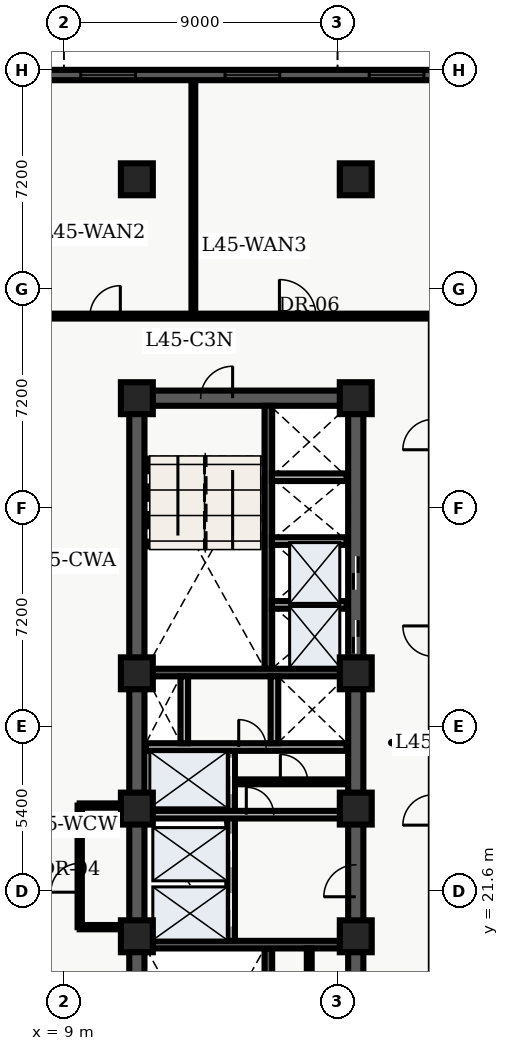
"""IFC4 building model, lengths in metres.
Left out: names, types, materials, properties, quantities, classifications, styles, units other than length and angle.
Written with IfcOpenShell. Run it as: python <this file> out.ifc"""

import sys

from ifc_helpers import new_model, entity, si_unit, converted_unit, direction, frame, origin_with_axes, origin_2d_with_axis, place, context, subcontext, project, spatial, polyline, rectangle, outline, extrude, element, fill, save


model = new_model("IFC4")
c1 = context("Model", 3, precision=1e-05, world=origin_with_axes(), true_north=direction((0.0, 1.0)))
c2 = subcontext(c1, "Body", "Model", "MODEL_VIEW")
j1 = project(units=[si_unit("LENGTHUNIT", "METRE"), converted_unit("PLANEANGLEUNIT", "DEGREE", entity("IfcPlaneAngleMeasure", 0.017), si_unit("PLANEANGLEUNIT", "RADIAN"), dimensions=[0, 0, 0, 0, 0, 0, 0])], contexts=[c1])
p1 = place(None, origin_with_axes())
s1 = spatial("IfcSite", under=j1, at=p1, CompositionType="ELEMENT")
p2 = place(p1, origin_with_axes())
s2 = spatial("IfcBuilding", under=s1, at=p2, CompositionType="ELEMENT")
p3 = place(p2, frame((0.0, 0.0, 183.6), z_axis=(0.0, 0.0, 1.0), x_axis=(1.0, 0.0, 0.0)))
s3 = spatial("IfcBuildingStorey", under=s2, at=p3, CompositionType="ELEMENT", Elevation=183.6)
p4 = place(p3, frame((11.4, 10.8, 0.0), z_axis=(0.0, 0.0, 1.0), x_axis=(0.0, 1.0, 0.0)))
e1 = element("IfcWall", 1, at=p4, inside=s3, PredefinedType="SHEAR", context=c2, shape_type="SweptSolid", body=[
    extrude(outline(polyline([(0.0, -0.25), (27.0, -0.25), (27.0, 0.25), (0.0, 0.25), (0.0, -0.25)])), origin_with_axes(), (0.0, 0.0, 1.0), 3.6),
])
p5 = place(p3, frame((11.4, 37.8, 0.0), z_axis=(0.0, 0.0, 1.0), x_axis=(1.0, 0.0, 0.0)))
e2 = element("IfcWall", 2, at=p5, inside=s3, PredefinedType="SHEAR", context=c2, shape_type="SweptSolid", body=[
    extrude(outline(polyline([(0.0, -0.25), (7.2, -0.25), (7.2, 0.25), (0.0, 0.25), (0.0, -0.25)])), origin_with_axes(), (0.0, 0.0, 1.0), 3.6),
])
p6 = place(p5, frame((2.625, 0.0, 0.0), z_axis=(0.0, 0.0, 1.0), x_axis=(1.0, 0.0, 0.0)))
e3 = element("IfcOpeningElement", 3, at=p6, cuts=e2, PredefinedType="OPENING", context=c2, shape_type="SweptSolid", body=[
    extrude(rectangle(XDim=1.05, YDim=0.52, at=origin_2d_with_axis()), origin_with_axes(), (0.0, 0.0, 1.0), 2.15),
])
p7 = place(p3, frame((18.6, 10.8, 0.0), z_axis=(0.0, 0.0, 1.0), x_axis=(0.0, 1.0, 0.0)))
e4 = element("IfcWall", 4, at=p7, inside=s3, PredefinedType="SHEAR", context=c2, shape_type="SweptSolid", body=[
    extrude(outline(polyline([(0.0, -0.25), (13.5, -0.25), (13.5, 0.25), (0.0, 0.25), (0.0, -0.25)])), origin_with_axes(), (0.0, 0.0, 1.0), 3.6),
])
p8 = place(p7, frame((11.125, 0.0, 0.0), z_axis=(0.0, 0.0, 1.0), x_axis=(1.0, 0.0, 0.0)))
e5 = element("IfcOpeningElement", 5, at=p8, cuts=e4, PredefinedType="OPENING", context=c2, shape_type="SweptSolid", body=[
    extrude(rectangle(XDim=1.05, YDim=0.52, at=origin_2d_with_axis()), origin_with_axes(), (0.0, 0.0, 1.0), 2.15),
])
p9 = place(p7, frame((2.125, 0.0, 0.0), z_axis=(0.0, 0.0, 1.0), x_axis=(1.0, 0.0, 0.0)))
e6 = element("IfcOpeningElement", 6, at=p9, cuts=e4, PredefinedType="OPENING", context=c2, shape_type="SweptSolid", body=[
    extrude(rectangle(XDim=0.95, YDim=0.52, at=origin_2d_with_axis()), origin_with_axes(), (0.0, 0.0, 1.0), 2.15),
])
p10 = place(p7, frame((6.275, 0.0, 0.0), z_axis=(0.0, 0.0, 1.0), x_axis=(1.0, 0.0, 0.0)))
e7 = element("IfcOpeningElement", 7, at=p10, cuts=e4, PredefinedType="OPENING", context=c2, shape_type="SweptSolid", body=[
    extrude(rectangle(XDim=0.95, YDim=0.52, at=origin_2d_with_axis()), origin_with_axes(), (0.0, 0.0, 1.0), 2.15),
])
p11 = place(p3, frame((18.6, 24.3, 0.0), z_axis=(0.0, 0.0, 1.0), x_axis=(0.0, 1.0, 0.0)))
e8 = element("IfcWall", 8, at=p11, inside=s3, PredefinedType="SHEAR", context=c2, shape_type="SweptSolid", body=[
    extrude(outline(polyline([(0.0, -0.25), (13.5, -0.25), (13.5, 0.25), (0.0, 0.25), (0.0, -0.25)])), origin_with_axes(), (0.0, 0.0, 1.0), 3.6),
])
p12 = place(p11, frame((5.65, 0.0, 0.0), z_axis=(0.0, 0.0, 1.0), x_axis=(1.0, 0.0, 0.0)))
e9 = element("IfcOpeningElement", 9, at=p12, cuts=e8, PredefinedType="OPENING", context=c2, shape_type="SweptSolid", body=[
    extrude(rectangle(XDim=1.1, YDim=0.52, at=origin_2d_with_axis()), origin_with_axes(), (0.0, 0.0, 1.0), 2.15),
])
p13 = place(p11, frame((7.75, 0.0, 0.0), z_axis=(0.0, 0.0, 1.0), x_axis=(1.0, 0.0, 0.0)))
e10 = element("IfcOpeningElement", 10, at=p13, cuts=e8, PredefinedType="OPENING", context=c2, shape_type="SweptSolid", body=[
    extrude(rectangle(XDim=1.1, YDim=0.52, at=origin_2d_with_axis()), origin_with_axes(), (0.0, 0.0, 1.0), 2.15),
])
p14 = place(p3, frame((15.725, 11.05, 0.0), z_axis=(0.0, 0.0, 1.0), x_axis=(0.0, 1.0, 0.0)))
e11 = element("IfcWall", 11, at=p14, inside=s3, PredefinedType="SHEAR", context=c2, shape_type="SweptSolid", body=[
    extrude(outline(polyline([(0.0, -0.125), (8.65, -0.125), (8.65, 0.125), (0.0, 0.125), (0.0, -0.125)])), origin_with_axes(), (0.0, 0.0, 1.0), 3.6),
])
p15 = place(p3, frame((11.65, 19.825, 0.0), z_axis=(0.0, 0.0, 1.0), x_axis=(1.0, 0.0, 0.0)))
e12 = element("IfcWall", 12, at=p15, inside=s3, PredefinedType="SHEAR", context=c2, shape_type="SweptSolid", body=[
    extrude(outline(polyline([(0.0, -0.125), (6.7, -0.125), (6.7, 0.125), (0.0, 0.125), (0.0, -0.125)])), origin_with_axes(), (0.0, 0.0, 1.0), 3.6),
])
p16 = place(p3, frame((15.725, 28.9, 0.0), z_axis=(0.0, 0.0, 1.0), x_axis=(0.0, 1.0, 0.0)))
e13 = element("IfcWall", 13, at=p16, inside=s3, PredefinedType="SHEAR", context=c2, shape_type="SweptSolid", body=[
    extrude(outline(polyline([(0.0, -0.125), (8.65, -0.125), (8.65, 0.125), (0.0, 0.125), (0.0, -0.125)])), origin_with_axes(), (0.0, 0.0, 1.0), 3.6),
])
p17 = place(p3, frame((11.65, 28.775, 0.0), z_axis=(0.0, 0.0, 1.0), x_axis=(1.0, 0.0, 0.0)))
e14 = element("IfcWall", 14, at=p17, inside=s3, PredefinedType="SHEAR", context=c2, shape_type="SweptSolid", body=[
    extrude(outline(polyline([(0.0, -0.125), (6.7, -0.125), (6.7, 0.125), (0.0, 0.125), (0.0, -0.125)])), origin_with_axes(), (0.0, 0.0, 1.0), 3.6),
])
p18 = place(p3, frame((14.5, 19.95, 0.0), z_axis=(0.0, 0.0, 1.0), x_axis=(0.0, 1.0, 0.0)))
e15 = element("IfcWall", 15, at=p18, inside=s3, PredefinedType="SOLIDWALL", context=c2, shape_type="SweptSolid", body=[
    extrude(outline(polyline([(0.0, -0.125), (6.25, -0.125), (6.25, 0.125), (0.0, 0.125), (0.0, -0.125)])), origin_with_axes(), (0.0, 0.0, 1.0), 2.64),
])
p19 = place(p18, frame((1.025, 0.0, 0.0), z_axis=(0.0, 0.0, 1.0), x_axis=(1.0, 0.0, 0.0)))
e16 = element("IfcOpeningElement", 16, at=p19, cuts=e15, PredefinedType="OPENING", context=c2, shape_type="SweptSolid", body=[
    extrude(rectangle(XDim=1.1, YDim=0.27, at=origin_2d_with_axis()), origin_with_axes(), (0.0, 0.0, 1.0), 2.15),
])
p20 = place(p18, frame((2.975, 0.0, 0.0), z_axis=(0.0, 0.0, 1.0), x_axis=(1.0, 0.0, 0.0)))
e17 = element("IfcOpeningElement", 17, at=p20, cuts=e15, PredefinedType="OPENING", context=c2, shape_type="SweptSolid", body=[
    extrude(rectangle(XDim=1.1, YDim=0.27, at=origin_2d_with_axis()), origin_with_axes(), (0.0, 0.0, 1.0), 2.15),
])
p21 = place(p18, frame((5.425, 0.0, 0.0), z_axis=(0.0, 0.0, 1.0), x_axis=(1.0, 0.0, 0.0)))
e18 = element("IfcOpeningElement", 18, at=p21, cuts=e15, PredefinedType="OPENING", context=c2, shape_type="SweptSolid", body=[
    extrude(rectangle(XDim=1.2, YDim=0.27, at=origin_2d_with_axis()), origin_with_axes(), (0.0, 0.0, 1.0), 2.15),
])
p22 = place(p3, frame((11.7, 24.1, 0.0), z_axis=(0.0, 0.0, 1.0), x_axis=(1.0, 0.0, 0.0)))
e19 = element("IfcWall", 19, at=p22, inside=s3, PredefinedType="SOLIDWALL", context=c2, shape_type="SweptSolid", body=[
    extrude(outline(polyline([(0.0, -0.125), (6.6, -0.125), (6.6, 0.125), (0.0, 0.125), (0.0, -0.125)])), origin_with_axes(), (0.0, 0.0, 1.0), 2.64),
])
p23 = place(p22, frame((3.75, 0.0, 0.0), z_axis=(0.0, 0.0, 1.0), x_axis=(1.0, 0.0, 0.0)))
e20 = element("IfcOpeningElement", 20, at=p23, cuts=e19, PredefinedType="OPENING", context=c2, shape_type="SweptSolid", body=[
    extrude(rectangle(XDim=0.9, YDim=0.27, at=origin_2d_with_axis()), origin_with_axes(), (0.0, 0.0, 1.0), 2.15),
])
p24 = place(p3, frame((11.7, 26.325, 0.0), z_axis=(0.0, 0.0, 1.0), x_axis=(1.0, 0.0, 0.0)))
e21 = element("IfcWall", 21, at=p24, inside=s3, PredefinedType="SOLIDWALL", context=c2, shape_type="SweptSolid", body=[
    extrude(outline(polyline([(0.0, -0.125), (6.6, -0.125), (6.6, 0.125), (0.0, 0.125), (0.0, -0.125)])), origin_with_axes(), (0.0, 0.0, 1.0), 2.64),
])
p25 = place(p24, frame((3.5, 0.0, 0.0), z_axis=(0.0, 0.0, 1.0), x_axis=(1.0, 0.0, 0.0)))
e22 = element("IfcOpeningElement", 22, at=p25, cuts=e21, PredefinedType="OPENING", context=c2, shape_type="SweptSolid", body=[
    extrude(rectangle(XDim=0.9, YDim=0.27, at=origin_2d_with_axis()), origin_with_axes(), (0.0, 0.0, 1.0), 2.15),
])
for number, where, z_axis, x_axis in (
    (23, (12.96, 26.45, 0.0), (0.0, 0.0, 1.0), (0.0, 1.0, 0.0)),
    (24, (15.925, 26.45, 0.0), (0.0, 0.0, 1.0), (0.0, 1.0, 0.0)),
):
    element("IfcWall", number, at=place(p3, frame(where, z_axis=z_axis, x_axis=x_axis)), inside=s3, PredefinedType="SOLIDWALL", context=c2, shape_type="SweptSolid", body=[
        extrude(outline(polyline([(0.0, -0.125), (2.2, -0.125), (2.2, 0.125), (0.0, 0.125), (0.0, -0.125)])), origin_with_axes(), (0.0, 0.0, 1.0), 2.64),
    ])
for number, where, z_axis, x_axis in (
    (25, (11.4, 20.1, 0.0), (0.0, 0.0, 1.0), (1.0, 0.0, 0.0)),
    (26, (11.4, 24.3, 0.0), (0.0, 0.0, 1.0), (1.0, 0.0, 0.0)),
    (27, (11.4, 28.75, 0.0), (0.0, 0.0, 1.0), (1.0, 0.0, 0.0)),
    (28, (11.4, 37.8, 0.0), (0.0, 0.0, 1.0), (1.0, 0.0, 0.0)),
    (29, (11.4, 45.0, 0.0), (0.0, 0.0, 1.0), (1.0, 0.0, 0.0)),
    (30, (18.6, 20.1, 0.0), (0.0, 0.0, 1.0), (1.0, 0.0, 0.0)),
    (31, (18.6, 24.3, 0.0), (0.0, 0.0, 1.0), (1.0, 0.0, 0.0)),
    (32, (18.6, 28.75, 0.0), (0.0, 0.0, 1.0), (1.0, 0.0, 0.0)),
    (33, (18.6, 37.8, 0.0), (0.0, 0.0, 1.0), (1.0, 0.0, 0.0)),
    (34, (18.6, 45.0, 0.0), (0.0, 0.0, 1.0), (1.0, 0.0, 0.0)),
):
    element("IfcColumn", number, at=place(p3, frame(where, z_axis=z_axis, x_axis=x_axis)), inside=s3, PredefinedType="COLUMN", context=c2, shape_type="SweptSolid", body=[
        extrude(rectangle(XDim=1.05, YDim=1.05, at=origin_2d_with_axis()), origin_with_axes(), (0.0, 0.0, 1.0), 3.9),
    ])
p26 = place(p3, frame((14.62, 25.18, 0.0), z_axis=(0.0, 0.0, 1.0), x_axis=(1.0, 0.0, 0.0)))
e35 = element("IfcWall", 35, at=p26, inside=s3, PredefinedType="PARTITIONING", context=c2, shape_type="SweptSolid", body=[
    extrude(outline(polyline([(0.0, -0.08), (3.68, -0.08), (3.68, 0.08), (0.0, 0.08), (0.0, -0.08)])), origin_with_axes(), (0.0, 0.0, 1.0), 2.64),
])
p27 = place(p26, frame((1.95, 0.0, 0.0), z_axis=(0.0, 0.0, 1.0), x_axis=(1.0, 0.0, 0.0)))
e36 = element("IfcOpeningElement", 36, at=p27, cuts=e35, PredefinedType="OPENING", context=c2, shape_type="SweptSolid", body=[
    extrude(rectangle(XDim=0.9, YDim=0.18, at=origin_2d_with_axis()), origin_with_axes(), (0.0, 0.0, 1.0), 2.15),
])
p28 = place(p3, frame((17.07, 14.28, 0.0), z_axis=(0.0, 0.0, 1.0), x_axis=(0.0, 1.0, 0.0)))
e37 = element("IfcWall", 37, at=p28, inside=s3, PredefinedType="PARTITIONING", context=c2, shape_type="SweptSolid", body=[
    extrude(outline(polyline([(0.0, -0.08), (5.42, -0.08), (5.42, 0.08), (0.0, 0.08), (0.0, -0.08)])), origin_with_axes(), (0.0, 0.0, 1.0), 2.64),
])
p29 = place(p28, frame((2.6, 0.0, 0.0), z_axis=(0.0, 0.0, 1.0), x_axis=(1.0, 0.0, 0.0)))
e38 = element("IfcOpeningElement", 38, at=p29, cuts=e37, PredefinedType="OPENING", context=c2, shape_type="SweptSolid", body=[
    extrude(rectangle(XDim=0.9, YDim=0.18, at=origin_2d_with_axis()), origin_with_axes(), (0.0, 0.0, 1.0), 2.15),
])
for number, where, z_axis, x_axis in (
    (39, (15.84, 31.0, 0.0), (0.0, 0.0, 1.0), (1.0, 0.0, 0.0)),
    (40, (15.84, 33.1, 0.0), (0.0, 0.0, 1.0), (1.0, 0.0, 0.0)),
    (41, (15.84, 35.2, 0.0), (0.0, 0.0, 1.0), (1.0, 0.0, 0.0)),
):
    element("IfcWall", number, at=place(p3, frame(where, z_axis=z_axis, x_axis=x_axis)), inside=s3, PredefinedType="SOLIDWALL", context=c2, shape_type="SweptSolid", body=[
        extrude(outline(polyline([(0.0, -0.125), (2.46, -0.125), (2.46, 0.125), (0.0, 0.125), (0.0, -0.125)])), origin_with_axes(), (0.0, 0.0, 1.0), 2.64),
    ])
p30 = place(p3, frame((9.52, 20.4, 0.0), z_axis=(0.0, 0.0, 1.0), x_axis=(0.0, 1.0, 0.0)))
e42 = element("IfcWall", 42, at=p30, inside=s3, PredefinedType="PARTITIONING", context=c2, shape_type="SweptSolid", body=[
    extrude(outline(polyline([(0.0, -0.07), (4.0, -0.07), (4.0, 0.07), (0.0, 0.07), (0.0, -0.07)])), origin_with_axes(), (0.0, 0.0, 1.0), 2.64),
])
p31 = place(p30, frame((1.625, 0.0, 0.0), z_axis=(0.0, 0.0, 1.0), x_axis=(1.0, 0.0, 0.0)))
e43 = element("IfcOpeningElement", 43, at=p31, cuts=e42, PredefinedType="OPENING", context=c2, shape_type="SweptSolid", body=[
    extrude(rectangle(XDim=0.95, YDim=0.16, at=origin_2d_with_axis()), origin_with_axes(), (0.0, 0.0, 1.0), 2.15),
])
for number, where, z_axis, x_axis in (
    (44, (9.52, 20.4, 0.0), (0.0, 0.0, 1.0), (1.0, 0.0, 0.0)),
    (45, (9.52, 24.4, 0.0), (0.0, 0.0, 1.0), (1.0, 0.0, 0.0)),
):
    element("IfcWall", number, at=place(p3, frame(where, z_axis=z_axis, x_axis=x_axis)), inside=s3, PredefinedType="PARTITIONING", context=c2, shape_type="SweptSolid", body=[
        extrude(outline(polyline([(0.0, -0.07), (1.58, -0.07), (1.58, 0.07), (0.0, 0.07), (0.0, -0.07)])), origin_with_axes(), (0.0, 0.0, 1.0), 2.64),
    ])
p32 = place(p3, frame((2.6, 40.5, 0.0), z_axis=(0.0, 0.0, 1.0), x_axis=(1.0, 0.0, 0.0)))
e46 = element("IfcWall", 46, at=p32, inside=s3, PredefinedType="PARTITIONING", context=c2, shape_type="SweptSolid", body=[
    extrude(outline(polyline([(0.0, -0.08), (23.459, -0.08), (23.459, 0.08), (0.0, 0.08), (0.0, -0.08)])), origin_with_axes(), (0.0, 0.0, 1.0), 2.64),
])
p33 = place(p32, frame((2.422, 0.0, 0.0), z_axis=(0.0, 0.0, 1.0), x_axis=(1.0, 0.0, 0.0)))
e47 = element("IfcOpeningElement", 47, at=p33, cuts=e46, PredefinedType="OPENING", context=c2, shape_type="SweptSolid", body=[
    extrude(rectangle(XDim=1.0, YDim=0.18, at=origin_2d_with_axis()), origin_with_axes(), (0.0, 0.0, 1.0), 2.15),
])
p34 = place(p32, frame((7.756, 0.0, 0.0), z_axis=(0.0, 0.0, 1.0), x_axis=(1.0, 0.0, 0.0)))
e48 = element("IfcOpeningElement", 48, at=p34, cuts=e46, PredefinedType="OPENING", context=c2, shape_type="SweptSolid", body=[
    extrude(rectangle(XDim=1.0, YDim=0.18, at=origin_2d_with_axis()), origin_with_axes(), (0.0, 0.0, 1.0), 2.15),
])
p35 = place(p32, frame((14.089, 0.0, 0.0), z_axis=(0.0, 0.0, 1.0), x_axis=(1.0, 0.0, 0.0)))
e49 = element("IfcOpeningElement", 49, at=p35, cuts=e46, PredefinedType="OPENING", context=c2, shape_type="SweptSolid", body=[
    extrude(rectangle(XDim=1.2, YDim=0.18, at=origin_2d_with_axis()), origin_with_axes(), (0.0, 0.0, 1.0), 2.2),
])
p36 = place(p3, frame((13.258, 40.6, 0.0), z_axis=(0.0, 0.0, 1.0), x_axis=(0.0, 1.0, 0.0)))
e50 = element("IfcWall", 50, at=p36, inside=s3, PredefinedType="PARTITIONING", context=c2, shape_type="SweptSolid", body=[
    extrude(outline(polyline([(0.0, -0.062), (7.665, -0.062), (7.665, 0.062), (0.0, 0.062), (0.0, -0.062)])), origin_with_axes(), (0.0, 0.0, 1.0), 2.64),
])
p37 = place(p3, frame((2.74, 48.43, 0.0), z_axis=(0.0, 0.0, 1.0), x_axis=(1.0, 0.0, 0.0)))
e51 = element("IfcWall", 51, at=p37, inside=s3, PredefinedType="SOLIDWALL", context=c2, shape_type="SweptSolid", body=[
    extrude(outline(polyline([(0.0, -0.17), (20.174, -0.17), (20.174, 0.17), (0.0, 0.17), (0.0, -0.17)])), origin_with_axes(), (0.0, 0.0, 1.0), 3.6),
])
p38 = place(p37, frame((2.972, 0.0, 0.45), z_axis=(0.0, 0.0, 1.0), x_axis=(1.0, 0.0, 0.0)))
e52 = element("IfcOpeningElement", 52, at=p38, cuts=e51, PredefinedType="OPENING", context=c2, shape_type="SweptSolid", body=[
    extrude(rectangle(XDim=1.8, YDim=0.36, at=origin_2d_with_axis()), origin_with_axes(), (0.0, 0.0, 1.0), 2.1),
])
p39 = place(p37, frame((7.715, 0.0, 0.45), z_axis=(0.0, 0.0, 1.0), x_axis=(1.0, 0.0, 0.0)))
e53 = element("IfcOpeningElement", 53, at=p39, cuts=e51, PredefinedType="OPENING", context=c2, shape_type="SweptSolid", body=[
    extrude(rectangle(XDim=1.8, YDim=0.36, at=origin_2d_with_axis()), origin_with_axes(), (0.0, 0.0, 1.0), 2.1),
])
p40 = place(p37, frame((12.459, 0.0, 0.45), z_axis=(0.0, 0.0, 1.0), x_axis=(1.0, 0.0, 0.0)))
e54 = element("IfcOpeningElement", 54, at=p40, cuts=e51, PredefinedType="OPENING", context=c2, shape_type="SweptSolid", body=[
    extrude(rectangle(XDim=1.8, YDim=0.36, at=origin_2d_with_axis()), origin_with_axes(), (0.0, 0.0, 1.0), 2.1),
])
p41 = place(p37, frame((17.202, 0.0, 0.45), z_axis=(0.0, 0.0, 1.0), x_axis=(1.0, 0.0, 0.0)))
e55 = element("IfcOpeningElement", 55, at=p41, cuts=e51, PredefinedType="OPENING", context=c2, shape_type="SweptSolid", body=[
    extrude(rectangle(XDim=1.8, YDim=0.36, at=origin_2d_with_axis()), origin_with_axes(), (0.0, 0.0, 1.0), 2.1),
])
p42 = place(p11, frame((5.65, 0.0, 0.0), z_axis=(0.0, 0.0, 1.0), x_axis=(1.0, 0.0, 0.0)))
e56 = element("IfcDoor", 56, at=p42, inside=s3, OperationType="SLIDING_TO_LEFT", PredefinedType="DOOR", context=c2, shape_type="SweptSolid", body=[
    extrude(rectangle(XDim=1.1, YDim=0.09, at=origin_2d_with_axis()), origin_with_axes(), (0.0, 0.0, 1.0), 2.15),
])
fill(e9, e56)
p43 = place(p11, frame((7.75, 0.0, 0.0), z_axis=(0.0, 0.0, 1.0), x_axis=(1.0, 0.0, 0.0)))
e57 = element("IfcDoor", 57, at=p43, inside=s3, OperationType="SLIDING_TO_RIGHT", PredefinedType="DOOR", context=c2, shape_type="SweptSolid", body=[
    extrude(rectangle(XDim=1.1, YDim=0.09, at=origin_2d_with_axis()), origin_with_axes(), (0.0, 0.0, 1.0), 2.15),
])
fill(e10, e57)
p44 = place(p18, frame((1.025, 0.0, 0.0), z_axis=(0.0, 0.0, 1.0), x_axis=(1.0, 0.0, 0.0)))
e58 = element("IfcDoor", 58, at=p44, inside=s3, OperationType="SLIDING_TO_LEFT", PredefinedType="DOOR", context=c2, shape_type="SweptSolid", body=[
    extrude(rectangle(XDim=1.1, YDim=0.09, at=origin_2d_with_axis()), origin_with_axes(), (0.0, 0.0, 1.0), 2.15),
])
fill(e16, e58)
p45 = place(p18, frame((2.975, 0.0, 0.0), z_axis=(0.0, 0.0, 1.0), x_axis=(1.0, 0.0, 0.0)))
e59 = element("IfcDoor", 59, at=p45, inside=s3, OperationType="SLIDING_TO_RIGHT", PredefinedType="DOOR", context=c2, shape_type="SweptSolid", body=[
    extrude(rectangle(XDim=1.1, YDim=0.09, at=origin_2d_with_axis()), origin_with_axes(), (0.0, 0.0, 1.0), 2.15),
])
fill(e17, e59)
p46 = place(p18, frame((5.425, 0.0, 0.0), z_axis=(0.0, 0.0, 1.0), x_axis=(1.0, 0.0, 0.0)))
e60 = element("IfcDoor", 60, at=p46, inside=s3, OperationType="DOUBLE_DOOR_SLIDING", PredefinedType="DOOR", context=c2, shape_type="SweptSolid", body=[
    extrude(rectangle(XDim=1.2, YDim=0.09, at=origin_2d_with_axis()), origin_with_axes(), (0.0, 0.0, 1.0), 2.15),
])
fill(e18, e60)
p47 = place(p5, frame((2.625, 0.0, 0.0), z_axis=(0.0, 0.0, 1.0), x_axis=(1.0, 0.0, 0.0)))
e61 = element("IfcDoor", 61, at=p47, inside=s3, OperationType="SINGLE_SWING_RIGHT", PredefinedType="DOOR", context=c2, shape_type="SweptSolid", body=[
    extrude(rectangle(XDim=1.05, YDim=0.09, at=origin_2d_with_axis()), origin_with_axes(), (0.0, 0.0, 1.0), 2.15),
])
fill(e3, e61)
p48 = place(p7, frame((11.125, 0.0, 0.0), z_axis=(0.0, 0.0, 1.0), x_axis=(1.0, 0.0, 0.0)))
e62 = element("IfcDoor", 62, at=p48, inside=s3, OperationType="SINGLE_SWING_LEFT", PredefinedType="DOOR", context=c2, shape_type="SweptSolid", body=[
    extrude(rectangle(XDim=1.05, YDim=0.09, at=origin_2d_with_axis()), origin_with_axes(), (0.0, 0.0, 1.0), 2.15),
])
fill(e5, e62)
p49 = place(p24, frame((3.5, 0.0, 0.0), z_axis=(0.0, 0.0, 1.0), x_axis=(1.0, 0.0, 0.0)))
e63 = element("IfcDoor", 63, at=p49, inside=s3, OperationType="SINGLE_SWING_LEFT", PredefinedType="DOOR", context=c2, shape_type="SweptSolid", body=[
    extrude(rectangle(XDim=0.9, YDim=0.09, at=origin_2d_with_axis()), origin_with_axes(), (0.0, 0.0, 1.0), 2.15),
])
fill(e22, e63)
p50 = place(p22, frame((3.75, 0.0, 0.0), z_axis=(0.0, 0.0, 1.0), x_axis=(1.0, 0.0, 0.0)))
e64 = element("IfcDoor", 64, at=p50, inside=s3, OperationType="SINGLE_SWING_LEFT", PredefinedType="DOOR", context=c2, shape_type="SweptSolid", body=[
    extrude(rectangle(XDim=0.9, YDim=0.09, at=origin_2d_with_axis()), origin_with_axes(), (0.0, 0.0, 1.0), 2.15),
])
fill(e20, e64)
p51 = place(p26, frame((1.95, 0.0, 0.0), z_axis=(0.0, 0.0, 1.0), x_axis=(1.0, 0.0, 0.0)))
e65 = element("IfcDoor", 65, at=p51, inside=s3, OperationType="SINGLE_SWING_LEFT", PredefinedType="DOOR", context=c2, shape_type="SweptSolid", body=[
    extrude(rectangle(XDim=0.9, YDim=0.09, at=origin_2d_with_axis()), origin_with_axes(), (0.0, 0.0, 1.0), 2.15),
])
fill(e36, e65)
p52 = place(p30, frame((1.625, 0.0, 0.0), z_axis=(0.0, 0.0, 1.0), x_axis=(1.0, 0.0, 0.0)))
e66 = element("IfcDoor", 66, at=p52, inside=s3, OperationType="SINGLE_SWING_LEFT", PredefinedType="DOOR", context=c2, shape_type="SweptSolid", body=[
    extrude(rectangle(XDim=0.95, YDim=0.084, at=origin_2d_with_axis()), origin_with_axes(), (0.0, 0.0, 1.0), 2.15),
])
fill(e43, e66)
p53 = place(p32, frame((7.756, 0.0, 0.0), z_axis=(0.0, 0.0, 1.0), x_axis=(1.0, 0.0, 0.0)))
e67 = element("IfcDoor", 67, at=p53, inside=s3, OperationType="SINGLE_SWING_RIGHT", PredefinedType="DOOR", context=c2, shape_type="SweptSolid", body=[
    extrude(rectangle(XDim=1.0, YDim=0.09, at=origin_2d_with_axis()), origin_with_axes(), (0.0, 0.0, 1.0), 2.15),
])
fill(e48, e67)
p54 = place(p32, frame((14.089, 0.0, 0.0), z_axis=(0.0, 0.0, 1.0), x_axis=(1.0, 0.0, 0.0)))
e68 = element("IfcDoor", 68, at=p54, inside=s3, OperationType="SINGLE_SWING_LEFT", PredefinedType="DOOR", context=c2, shape_type="SweptSolid", body=[
    extrude(rectangle(XDim=1.2, YDim=0.09, at=origin_2d_with_axis()), origin_with_axes(), (0.0, 0.0, 1.0), 2.2),
])
fill(e49, e68)
p55 = place(p37, frame((7.715, 0.0, 0.45), z_axis=(0.0, 0.0, 1.0), x_axis=(1.0, 0.0, 0.0)))
e69 = element("IfcWindow", 69, at=p55, inside=s3, PredefinedType="WINDOW", context=c2, shape_type="SweptSolid", body=[
    extrude(rectangle(XDim=1.8, YDim=0.09, at=origin_2d_with_axis()), origin_with_axes(), (0.0, 0.0, 1.0), 2.1),
])
fill(e53, e69)
p56 = place(p37, frame((12.459, 0.0, 0.45), z_axis=(0.0, 0.0, 1.0), x_axis=(1.0, 0.0, 0.0)))
e70 = element("IfcWindow", 70, at=p56, inside=s3, PredefinedType="WINDOW", context=c2, shape_type="SweptSolid", body=[
    extrude(rectangle(XDim=1.8, YDim=0.09, at=origin_2d_with_axis()), origin_with_axes(), (0.0, 0.0, 1.0), 2.1),
])
fill(e54, e70)
p57 = place(p37, frame((17.202, 0.0, 0.45), z_axis=(0.0, 0.0, 1.0), x_axis=(1.0, 0.0, 0.0)))
e71 = element("IfcWindow", 71, at=p57, inside=s3, PredefinedType="WINDOW", context=c2, shape_type="SweptSolid", body=[
    extrude(rectangle(XDim=1.8, YDim=0.09, at=origin_2d_with_axis()), origin_with_axes(), (0.0, 0.0, 1.0), 2.1),
])
fill(e55, e71)
save(model, sys.argv[1])
